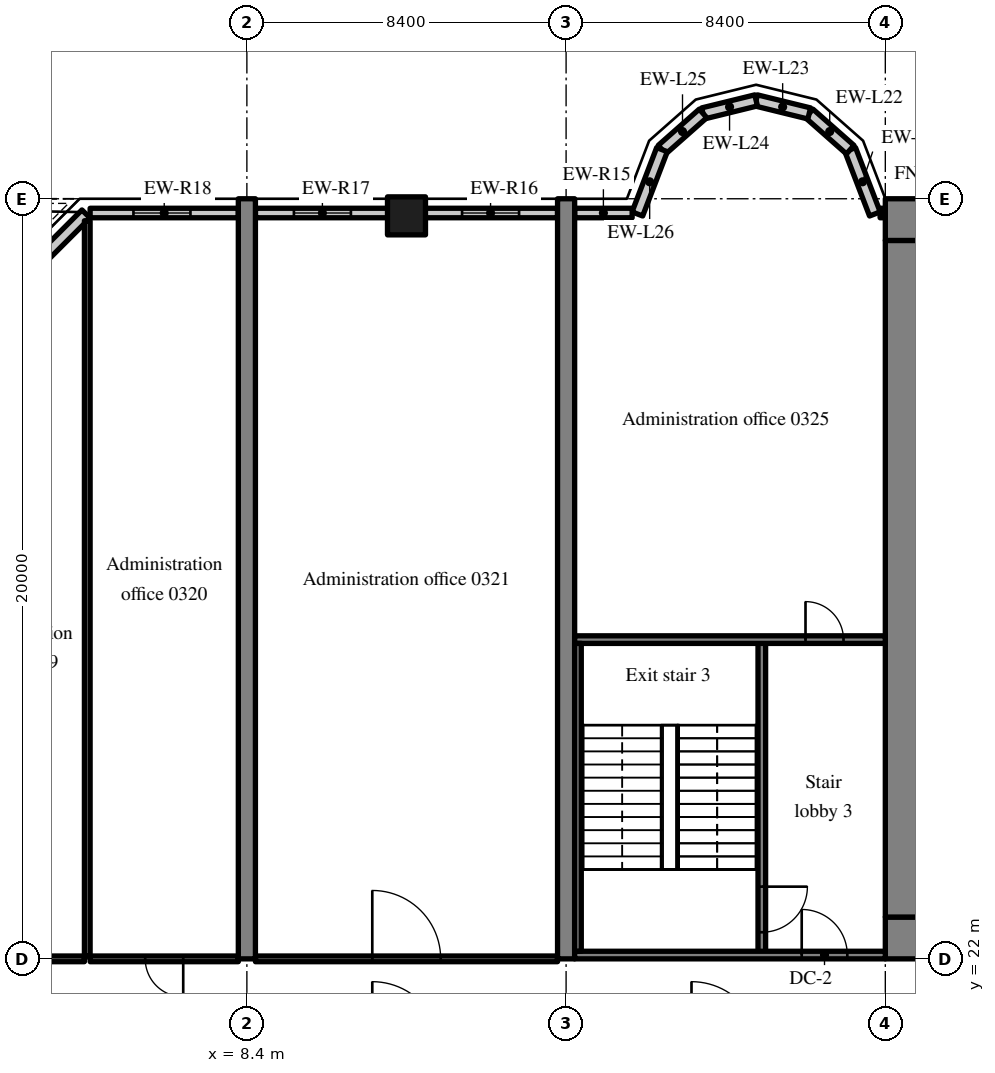
"""IFC4 building model, lengths in metres.
Left out: names, types, materials, properties, quantities, classifications, styles, units other than length and angle.
Written with IfcOpenShell. Run it as: python <this file> out.ifc"""

import sys

from ifc_helpers import new_model, si_unit, direction, frame, frame_2d, origin, origin_2d, place, context, subcontext, project, spatial, rectangle, extrude, source, transform, mapped, element, fill, save


model = new_model("IFC4")
c1 = context("Model", 3, precision=1e-05, world=origin(), true_north=direction((0.0, 1.0)))
c2 = subcontext(c1, "Body", "Model", "MODEL_VIEW")
j1 = project(units=[si_unit("LENGTHUNIT", "METRE"), si_unit("PLANEANGLEUNIT", "RADIAN")], contexts=[c1])
p1 = place(None, origin())
s1 = spatial("IfcSite", under=j1, at=p1, CompositionType="ELEMENT")
p2 = place(p1, origin())
s2 = spatial("IfcBuilding", under=s1, at=p2, CompositionType="ELEMENT")
p3 = place(p2, frame((0.0, 0.0, 18.0)))
s3 = spatial("IfcBuildingStorey", under=s2, at=p3, CompositionType="ELEMENT", Elevation=18.0)
m1 = source(origin(), c2, "Body", "SweptSolid", [
    extrude(rectangle(XDim=50.4, YDim=1.1, at=frame_2d((25.2, 0.0))), origin(), (0.0, 0.0, 1.0), 4.72),
])
p4 = place(p3, frame((25.2, 22.55, 0.0), z_axis=(0.0, 0.0, 1.0), x_axis=(1.0, 0.0, 0.0)))
e1 = element("IfcWall", 1, at=p4, inside=s3, PredefinedType="SHEAR", context=c2, shape_type="MappedRepresentation", body=[
    mapped(m1, transform((0.0, 0.0, 0.0), scale=1.0)),
])
m2 = source(origin(), c2, "Body", "SweptSolid", [
    extrude(rectangle(XDim=1.8, YDim=2.1, at=frame_2d((0.9, 1.05))), frame((0.0, 0.56, 0.0), z_axis=(0.0, -1.0, 0.0), x_axis=(1.0, 0.0, 0.0)), (0.0, 0.0, 1.0), 1.12),
])
p5 = place(p4, frame((15.9, 0.0, 0.0)))
e2 = element("IfcOpeningElement", 2, at=p5, cuts=e1, PredefinedType="OPENING", context=c2, shape_type="MappedRepresentation", body=[
    mapped(m2, transform((0.0, 0.0, 0.0), scale=1.0)),
])
m3 = source(origin(), c2, "Body", "SweptSolid", [
    extrude(rectangle(XDim=1.2, YDim=2.1, at=frame_2d((0.6, 1.05))), frame((0.0, 0.56, 0.0), z_axis=(0.0, -1.0, 0.0), x_axis=(1.0, 0.0, 0.0)), (0.0, 0.0, 1.0), 1.12),
])
p6 = place(p4, frame((27.0, 0.0, 0.0)))
e3 = element("IfcOpeningElement", 3, at=p6, cuts=e1, PredefinedType="OPENING", context=c2, shape_type="MappedRepresentation", body=[
    mapped(m3, transform((0.0, 0.0, 0.0), scale=1.0)),
])
m4 = source(origin(), c2, "Body", "SweptSolid", [
    extrude(rectangle(XDim=0.9, YDim=2.1, at=frame_2d((0.45, 1.05))), frame((0.0, 0.56, 0.0), z_axis=(0.0, -1.0, 0.0), x_axis=(1.0, 0.0, 0.0)), (0.0, 0.0, 1.0), 1.12),
])
p7 = place(p4, frame((34.5, 0.0, 0.0)))
e4 = element("IfcOpeningElement", 4, at=p7, cuts=e1, PredefinedType="OPENING", context=c2, shape_type="MappedRepresentation", body=[
    mapped(m4, transform((0.0, 0.0, 0.0), scale=1.0)),
])
p8 = place(p4, frame((31.5, 0.0, 0.0)))
e5 = element("IfcOpeningElement", 5, at=p8, cuts=e1, PredefinedType="OPENING", context=c2, shape_type="MappedRepresentation", body=[
    mapped(m4, transform((0.0, 0.0, 0.0), scale=1.0)),
])
p9 = place(p4, frame((39.75, 0.0, 0.0)))
e6 = element("IfcOpeningElement", 6, at=p9, cuts=e1, PredefinedType="OPENING", context=c2, shape_type="MappedRepresentation", body=[
    mapped(m4, transform((0.0, 0.0, 0.0), scale=1.0)),
])
p10 = place(p4, frame((36.75, 0.0, 0.0)))
e7 = element("IfcOpeningElement", 7, at=p10, cuts=e1, PredefinedType="OPENING", context=c2, shape_type="MappedRepresentation", body=[
    mapped(m4, transform((0.0, 0.0, 0.0), scale=1.0)),
])
p11 = place(p4, frame((6.425, 0.0, 0.0)))
e8 = element("IfcOpeningElement", 8, at=p11, cuts=e1, PredefinedType="OPENING", context=c2, shape_type="MappedRepresentation", body=[
    mapped(m3, transform((0.0, 0.0, 0.0), scale=1.0)),
])
p12 = place(p4, frame((47.675, 0.0, 0.0)))
e9 = element("IfcOpeningElement", 9, at=p12, cuts=e1, PredefinedType="OPENING", context=c2, shape_type="MappedRepresentation", body=[
    mapped(m3, transform((0.0, 0.0, 0.0), scale=1.0)),
])
p13 = place(p3, frame((25.2, 41.45, 0.0), z_axis=(0.0, 0.0, 1.0), x_axis=(1.0, 0.0, 0.0)))
e10 = element("IfcWall", 10, at=p13, inside=s3, PredefinedType="SHEAR", context=c2, shape_type="MappedRepresentation", body=[
    mapped(m1, transform((0.0, 0.0, 0.0), scale=1.0)),
])
m5 = source(origin(), c2, "Body", "SweptSolid", [
    extrude(rectangle(XDim=17.8, YDim=1.1, at=frame_2d((8.9, 0.0))), origin(), (0.0, 0.0, 1.0), 4.72),
])
p14 = place(p3, frame((25.75, 23.1, 0.0), z_axis=(0.0, 0.0, 1.0), x_axis=(0.0, 1.0, 0.0)))
e11 = element("IfcWall", 11, at=p14, inside=s3, PredefinedType="SHEAR", context=c2, shape_type="MappedRepresentation", body=[
    mapped(m5, transform((0.0, 0.0, 0.0), scale=1.0)),
])
m6 = source(origin(), c2, "Body", "SweptSolid", [
    extrude(rectangle(XDim=20.0, YDim=0.45, at=frame_2d((10.0, 0.0))), origin(), (0.0, 0.0, 1.0), 4.72),
])
for number, where, z_axis, x_axis in (
    (12, (8.4, 22.0, 0.0), (0.0, 0.0, 1.0), (0.0, 1.0, 0.0)),
    (13, (16.8, 22.0, 0.0), (0.0, 0.0, 1.0), (0.0, 1.0, 0.0)),
):
    element("IfcWall", number, at=place(p3, frame(where, z_axis=z_axis, x_axis=x_axis)), inside=s3, PredefinedType="SHEAR", context=c2, shape_type="MappedRepresentation", body=[
        mapped(m6, transform((0.0, 0.0, 0.0), scale=1.0)),
    ])
m7 = source(origin(), c2, "Body", "SweptSolid", [
    extrude(rectangle(XDim=1.0, YDim=1.0, at=origin_2d()), origin(), (0.0, 0.0, 1.0), 4.72),
])
p15 = place(p3, frame((12.6, 41.55, 0.0), z_axis=(0.0, 0.0, 1.0), x_axis=(1.0, 0.0, 0.0)))
e14 = element("IfcColumn", 14, at=p15, inside=s3, PredefinedType="COLUMN", context=c2, shape_type="MappedRepresentation", body=[
    mapped(m7, transform((0.0, 0.0, 0.0), scale=1.0)),
])
m8 = source(origin(), c2, "Body", "SweptSolid", [
    extrude(rectangle(XDim=0.138, YDim=0.25, at=frame_2d((0.069, 0.0))), origin(), (0.0, 0.0, 1.0), 3.97),
])
p16 = place(p3, frame((25.2, 41.625, 0.0), z_axis=(0.0, 0.0, 1.0), x_axis=(-1.0, 0.0, 0.0)))
e15 = element("IfcWall", 15, at=p16, inside=s3, PredefinedType="SOLIDWALL", context=c2, shape_type="MappedRepresentation", body=[
    mapped(m8, transform((0.0, 0.0, 0.0), scale=1.0)),
])
m9 = source(origin(), c2, "Body", "SweptSolid", [
    extrude(rectangle(XDim=1.812, YDim=0.3, at=frame_2d((0.906, 0.0))), origin(), (0.0, 0.0, 1.0), 4.72),
])
p17 = place(p3, frame((24.925, 41.6, 0.0), z_axis=(0.0, 0.0, 1.0), x_axis=(-0.357759776872, 0.933813654886, 0.0)))
e16 = element("IfcWall", 16, at=p17, inside=s3, PredefinedType="SOLIDWALL", context=c2, shape_type="MappedRepresentation", body=[
    mapped(m9, transform((0.0, 0.0, 0.0), scale=1.0)),
])
m10 = source(origin(), c2, "Body", "SweptSolid", [
    extrude(rectangle(XDim=1.44, YDim=0.3, at=frame_2d((0.72, 0.0))), origin(), (0.0, 0.0, 1.0), 4.72),
])
p18 = place(p3, frame((24.277, 43.292, 0.0), z_axis=(0.0, 0.0, 1.0), x_axis=(-0.749649827867, 0.661834673902, 0.0)))
e17 = element("IfcWall", 17, at=p18, inside=s3, PredefinedType="SOLIDWALL", context=c2, shape_type="MappedRepresentation", body=[
    mapped(m10, transform((0.0, 0.0, 0.0), scale=1.0)),
])
m11 = source(origin(), c2, "Body", "SweptSolid", [
    extrude(rectangle(XDim=1.438, YDim=0.3, at=frame_2d((0.719, 0.0))), origin(), (0.0, 0.0, 1.0), 4.72),
])
p19 = place(p3, frame((23.197, 44.245, 0.0), z_axis=(0.0, 0.0, 1.0), x_axis=(-0.971152283879, 0.238460146601, 0.0)))
e18 = element("IfcWall", 18, at=p19, inside=s3, PredefinedType="SOLIDWALL", context=c2, shape_type="MappedRepresentation", body=[
    mapped(m11, transform((0.0, 0.0, 0.0), scale=1.0)),
])
m12 = source(origin(), c2, "Body", "SweptSolid", [
    extrude(rectangle(XDim=1.439, YDim=0.3, at=frame_2d((0.719, 0.0))), origin(), (0.0, 0.0, 1.0), 4.72),
])
p20 = place(p3, frame((21.8, 44.588, 0.0), z_axis=(0.0, 0.0, 1.0), x_axis=(-0.971161932466, -0.238420848351, 0.0)))
e19 = element("IfcWall", 19, at=p20, inside=s3, PredefinedType="SOLIDWALL", context=c2, shape_type="MappedRepresentation", body=[
    mapped(m12, transform((0.0, 0.0, 0.0), scale=1.0)),
])
m13 = source(origin(), c2, "Body", "SweptSolid", [
    extrude(rectangle(XDim=1.44, YDim=0.3, at=frame_2d((0.72, 0.0))), origin(), (0.0, 0.0, 1.0), 4.72),
])
p21 = place(p3, frame((20.403, 44.245, 0.0), z_axis=(0.0, 0.0, 1.0), x_axis=(-0.74957555648, -0.661918790432, 0.0)))
e20 = element("IfcWall", 20, at=p21, inside=s3, PredefinedType="SOLIDWALL", context=c2, shape_type="MappedRepresentation", body=[
    mapped(m13, transform((0.0, 0.0, 0.0), scale=1.0)),
])
m14 = source(origin(), c2, "Body", "SweptSolid", [
    extrude(rectangle(XDim=1.812, YDim=0.3, at=frame_2d((0.906, 0.0))), origin(), (0.0, 0.0, 1.0), 4.72),
])
p22 = place(p3, frame((19.323, 43.292, 0.0), z_axis=(0.0, 0.0, 1.0), x_axis=(-0.357877270961, -0.93376863244, 0.0)))
e21 = element("IfcWall", 21, at=p22, inside=s3, PredefinedType="SOLIDWALL", context=c2, shape_type="MappedRepresentation", body=[
    mapped(m14, transform((0.0, 0.0, 0.0), scale=1.0)),
])
m15 = source(origin(), c2, "Body", "SweptSolid", [
    extrude(rectangle(XDim=1.513, YDim=0.25, at=frame_2d((0.756, 0.0))), origin(), (0.0, 0.0, 1.0), 3.97),
])
p23 = place(p3, frame((18.538, 41.625, 0.0), z_axis=(0.0, 0.0, 1.0), x_axis=(-1.0, 0.0, 0.0)))
e22 = element("IfcWall", 22, at=p23, inside=s3, PredefinedType="SOLIDWALL", context=c2, shape_type="MappedRepresentation", body=[
    mapped(m15, transform((0.0, 0.0, 0.0), scale=1.0)),
])
m16 = source(origin(), c2, "Body", "SweptSolid", [
    extrude(rectangle(XDim=3.525, YDim=0.25, at=frame_2d((1.762, 0.0))), origin(), (0.0, 0.0, 1.0), 3.97),
])
p24 = place(p3, frame((16.575, 41.625, 0.0), z_axis=(0.0, 0.0, 1.0), x_axis=(-1.0, 0.0, 0.0)))
e23 = element("IfcWall", 23, at=p24, inside=s3, PredefinedType="SOLIDWALL", context=c2, shape_type="MappedRepresentation", body=[
    mapped(m16, transform((0.0, 0.0, 0.0), scale=1.0)),
])
m17 = source(origin(), c2, "Body", "SweptSolid", [
    extrude(rectangle(XDim=1.5, YDim=1.5, at=frame_2d((0.75, 0.75))), frame((0.0, 0.135, 0.0), z_axis=(0.0, -1.0, 0.0), x_axis=(1.0, 0.0, 0.0)), (0.0, 0.0, 1.0), 0.27),
])
p25 = place(p24, frame((1.012, 0.0, 0.9)))
e24 = element("IfcOpeningElement", 24, at=p25, cuts=e23, PredefinedType="OPENING", context=c2, shape_type="MappedRepresentation", body=[
    mapped(m17, transform((0.0, 0.0, 0.0), scale=1.0)),
])
p26 = place(p3, frame((12.15, 41.625, 0.0), z_axis=(0.0, 0.0, 1.0), x_axis=(-1.0, 0.0, 0.0)))
e25 = element("IfcWall", 25, at=p26, inside=s3, PredefinedType="SOLIDWALL", context=c2, shape_type="MappedRepresentation", body=[
    mapped(m16, transform((0.0, 0.0, 0.0), scale=1.0)),
])
p27 = place(p26, frame((1.012, 0.0, 0.9)))
e26 = element("IfcOpeningElement", 26, at=p27, cuts=e25, PredefinedType="OPENING", context=c2, shape_type="MappedRepresentation", body=[
    mapped(m17, transform((0.0, 0.0, 0.0), scale=1.0)),
])
m18 = source(origin(), c2, "Body", "SweptSolid", [
    extrude(rectangle(XDim=3.9, YDim=0.25, at=frame_2d((1.95, 0.0))), origin(), (0.0, 0.0, 1.0), 3.97),
])
p28 = place(p3, frame((8.175, 41.625, 0.0), z_axis=(0.0, 0.0, 1.0), x_axis=(-1.0, 0.0, 0.0)))
e27 = element("IfcWall", 27, at=p28, inside=s3, PredefinedType="SOLIDWALL", context=c2, shape_type="MappedRepresentation", body=[
    mapped(m18, transform((0.0, 0.0, 0.0), scale=1.0)),
])
p29 = place(p28, frame((1.26, 0.0, 0.9)))
e28 = element("IfcOpeningElement", 28, at=p29, cuts=e27, PredefinedType="OPENING", context=c2, shape_type="MappedRepresentation", body=[
    mapped(m17, transform((0.0, 0.0, 0.0), scale=1.0)),
])
m19 = source(origin(), c2, "Body", "SweptSolid", [
    extrude(rectangle(XDim=5.173, YDim=0.3, at=frame_2d((2.586, 0.0))), origin(), (0.0, 0.0, 1.0), 3.97),
])
p30 = place(p3, frame((4.166, 41.6, 0.0), z_axis=(0.0, 0.0, 1.0), x_axis=(-0.707106781187, -0.707106781187, 0.0)))
e29 = element("IfcWall", 29, at=p30, inside=s3, PredefinedType="SOLIDWALL", context=c2, shape_type="MappedRepresentation", body=[
    mapped(m19, transform((0.0, 0.0, 0.0), scale=1.0)),
])
m20 = source(origin(), c2, "Body", "SweptSolid", [
    extrude(rectangle(XDim=1.5, YDim=1.5, at=frame_2d((0.75, 0.75))), frame((0.0, 0.16, 0.0), z_axis=(0.0, -1.0, 0.0), x_axis=(1.0, 0.0, 0.0)), (0.0, 0.0, 1.0), 0.32),
])
p31 = place(p30, frame((1.836, 0.0, 0.9)))
e30 = element("IfcOpeningElement", 30, at=p31, cuts=e29, PredefinedType="OPENING", context=c2, shape_type="MappedRepresentation", body=[
    mapped(m20, transform((0.0, 0.0, 0.0), scale=1.0)),
])
m21 = source(origin(), c2, "Body", "SweptSolid", [
    extrude(rectangle(XDim=8.3, YDim=0.2, at=frame_2d((4.15, 0.0))), origin(), (0.0, 0.0, 1.0), 4.72),
])
p32 = place(p3, frame((21.95, 22.1, 0.0), z_axis=(0.0, 0.0, 1.0), x_axis=(0.0, 1.0, 0.0)))
e31 = element("IfcWall", 31, at=p32, inside=s3, PredefinedType="SOLIDWALL", context=c2, shape_type="MappedRepresentation", body=[
    mapped(m21, transform((0.0, 0.0, 0.0), scale=1.0)),
])
m22 = source(origin(), c2, "Body", "SweptSolid", [
    extrude(rectangle(XDim=1.2, YDim=2.1, at=frame_2d((0.6, 1.05))), frame((0.0, 0.11, 0.0), z_axis=(0.0, -1.0, 0.0), x_axis=(1.0, 0.0, 0.0)), (0.0, 0.0, 1.0), 0.22),
])
p33 = place(p32, frame((0.6, 0.0, 0.0)))
e32 = element("IfcOpeningElement", 32, at=p33, cuts=e31, PredefinedType="OPENING", context=c2, shape_type="MappedRepresentation", body=[
    mapped(m22, transform((0.0, 0.0, 0.0), scale=1.0)),
])
m23 = source(origin(), c2, "Body", "SweptSolid", [
    extrude(rectangle(XDim=8.175, YDim=0.2, at=frame_2d((4.087, 0.0))), origin(), (0.0, 0.0, 1.0), 4.72),
])
p34 = place(p3, frame((17.025, 22.1, 0.0), z_axis=(0.0, 0.0, 1.0), x_axis=(1.0, 0.0, 0.0)))
e33 = element("IfcWall", 33, at=p34, inside=s3, PredefinedType="SOLIDWALL", context=c2, shape_type="MappedRepresentation", body=[
    mapped(m23, transform((0.0, 0.0, 0.0), scale=1.0)),
])
p35 = place(p34, frame((5.975, 0.0, 0.0)))
e34 = element("IfcOpeningElement", 34, at=p35, cuts=e33, PredefinedType="OPENING", context=c2, shape_type="MappedRepresentation", body=[
    mapped(m22, transform((0.0, 0.0, 0.0), scale=1.0)),
])
p36 = place(p3, frame((17.025, 30.4, 0.0), z_axis=(0.0, 0.0, 1.0), x_axis=(1.0, 0.0, 0.0)))
e35 = element("IfcWall", 35, at=p36, inside=s3, PredefinedType="SOLIDWALL", context=c2, shape_type="MappedRepresentation", body=[
    mapped(m23, transform((0.0, 0.0, 0.0), scale=1.0)),
])
m24 = source(origin(), c2, "Body", "SweptSolid", [
    extrude(rectangle(XDim=1.0, YDim=2.1, at=frame_2d((0.5, 1.05))), frame((0.0, 0.11, 0.0), z_axis=(0.0, -1.0, 0.0), x_axis=(1.0, 0.0, 0.0)), (0.0, 0.0, 1.0), 0.22),
])
p37 = place(p36, frame((6.075, 0.0, 0.0)))
e36 = element("IfcOpeningElement", 36, at=p37, cuts=e35, PredefinedType="OPENING", context=c2, shape_type="MappedRepresentation", body=[
    mapped(m24, transform((0.0, 0.0, 0.0), scale=1.0)),
])
m25 = source(origin(), c2, "Body", "SweptSolid", [
    extrude(rectangle(XDim=8.1, YDim=0.175, at=frame_2d((4.05, 0.0))), origin(), (0.0, 0.0, 1.0), 4.72),
])
p38 = place(p3, frame((17.112, 22.2, 0.0), z_axis=(0.0, 0.0, 1.0), x_axis=(0.0, 1.0, 0.0)))
e37 = element("IfcWall", 37, at=p38, inside=s3, PredefinedType="SOLIDWALL", context=c2, shape_type="MappedRepresentation", body=[
    mapped(m25, transform((0.0, 0.0, 0.0), scale=1.0)),
])
m26 = source(origin(), c2, "Body", "SweptSolid", [
    extrude(rectangle(XDim=3.625, YDim=0.15, at=frame_2d((1.812, 0.0))), origin(), (0.0, 0.0, 1.0), 4.02),
])
p39 = place(p3, frame((0.5, 22.0, 0.0), z_axis=(0.0, 0.0, 1.0), x_axis=(1.0, 0.0, 0.0)))
e38 = element("IfcWall", 38, at=p39, inside=s3, PredefinedType="PARTITIONING", context=c2, shape_type="MappedRepresentation", body=[
    mapped(m26, transform((0.0, 0.0, 0.0), scale=1.0)),
])
m27 = source(origin(), c2, "Body", "SweptSolid", [
    extrude(rectangle(XDim=1.0, YDim=2.1, at=frame_2d((0.5, 1.05))), frame((0.0, 0.085, 0.0), z_axis=(0.0, -1.0, 0.0), x_axis=(1.0, 0.0, 0.0)), (0.0, 0.0, 1.0), 0.17),
])
p40 = place(p39, frame((1.288, 0.0, 0.0)))
e39 = element("IfcOpeningElement", 39, at=p40, cuts=e38, PredefinedType="OPENING", context=c2, shape_type="MappedRepresentation", body=[
    mapped(m27, transform((0.0, 0.0, 0.0), scale=1.0)),
])
m28 = source(origin(), c2, "Body", "SweptSolid", [
    extrude(rectangle(XDim=3.9, YDim=0.15, at=frame_2d((1.95, 0.0))), origin(), (0.0, 0.0, 1.0), 4.02),
])
p41 = place(p3, frame((4.275, 22.0, 0.0), z_axis=(0.0, 0.0, 1.0), x_axis=(1.0, 0.0, 0.0)))
e40 = element("IfcWall", 40, at=p41, inside=s3, PredefinedType="PARTITIONING", context=c2, shape_type="MappedRepresentation", body=[
    mapped(m28, transform((0.0, 0.0, 0.0), scale=1.0)),
])
p42 = place(p41, frame((1.45, 0.0, 0.0)))
e41 = element("IfcOpeningElement", 41, at=p42, cuts=e40, PredefinedType="OPENING", context=c2, shape_type="MappedRepresentation", body=[
    mapped(m27, transform((0.0, 0.0, 0.0), scale=1.0)),
])
m29 = source(origin(), c2, "Body", "SweptSolid", [
    extrude(rectangle(XDim=19.347, YDim=0.15, at=frame_2d((9.674, 0.0))), origin(), (0.0, 0.0, 1.0), 4.72),
])
p43 = place(p3, frame((4.2, 22.075, 0.0), z_axis=(0.0, 0.0, 1.0), x_axis=(0.0, 1.0, 0.0)))
e42 = element("IfcWall", 42, at=p43, inside=s3, PredefinedType="PARTITIONING", context=c2, shape_type="MappedRepresentation", body=[
    mapped(m29, transform((0.0, 0.0, 0.0), scale=1.0)),
])
m30 = source(origin(), c2, "Body", "SweptSolid", [
    extrude(rectangle(XDim=7.95, YDim=0.15, at=frame_2d((3.975, 0.0))), origin(), (0.0, 0.0, 1.0), 4.02),
])
p44 = place(p3, frame((8.625, 22.0, 0.0), z_axis=(0.0, 0.0, 1.0), x_axis=(1.0, 0.0, 0.0)))
e43 = element("IfcWall", 43, at=p44, inside=s3, PredefinedType="PARTITIONING", context=c2, shape_type="MappedRepresentation", body=[
    mapped(m30, transform((0.0, 0.0, 0.0), scale=1.0)),
])
m31 = source(origin(), c2, "Body", "SweptSolid", [
    extrude(rectangle(XDim=1.8, YDim=2.1, at=frame_2d((0.9, 1.05))), frame((0.0, 0.085, 0.0), z_axis=(0.0, -1.0, 0.0), x_axis=(1.0, 0.0, 0.0)), (0.0, 0.0, 1.0), 0.17),
])
p45 = place(p44, frame((3.075, 0.0, 0.0)))
e44 = element("IfcOpeningElement", 44, at=p45, cuts=e43, PredefinedType="OPENING", context=c2, shape_type="MappedRepresentation", body=[
    mapped(m31, transform((0.0, 0.0, 0.0), scale=1.0)),
])
m32 = source(origin(), c2, "Body", "SweptSolid", [
    extrude(rectangle(XDim=1.5, YDim=1.5, at=frame_2d((0.75, 0.75))), frame((0.0, 0.03, 0.0), z_axis=(0.0, -1.0, 0.0), x_axis=(1.0, 0.0, 0.0)), (0.0, 0.0, 1.0), 0.06),
])
p46 = place(p25, origin())
e45 = element("IfcWindow", 45, at=p46, inside=s3, PartitioningType="SINGLE_PANEL", PredefinedType="WINDOW", context=c2, shape_type="MappedRepresentation", body=[
    mapped(m32, transform((0.0, 0.0, 0.0), scale=1.0)),
])
fill(e24, e45)
p47 = place(p27, origin())
e46 = element("IfcWindow", 46, at=p47, inside=s3, PartitioningType="SINGLE_PANEL", PredefinedType="WINDOW", context=c2, shape_type="MappedRepresentation", body=[
    mapped(m32, transform((0.0, 0.0, 0.0), scale=1.0)),
])
fill(e26, e46)
p48 = place(p29, origin())
e47 = element("IfcWindow", 47, at=p48, inside=s3, PartitioningType="SINGLE_PANEL", PredefinedType="WINDOW", context=c2, shape_type="MappedRepresentation", body=[
    mapped(m32, transform((0.0, 0.0, 0.0), scale=1.0)),
])
fill(e28, e47)
m33 = source(origin(), c2, "Body", "SweptSolid", [
    extrude(rectangle(XDim=1.2, YDim=2.1, at=frame_2d((0.6, 1.05))), frame((0.0, 0.025, 0.0), z_axis=(0.0, -1.0, 0.0), x_axis=(1.0, 0.0, 0.0)), (0.0, 0.0, 1.0), 0.05),
])
p49 = place(p33, origin())
e48 = element("IfcDoor", 48, at=p49, inside=s3, OperationType="SINGLE_SWING_RIGHT", PredefinedType="DOOR", context=c2, shape_type="MappedRepresentation", body=[
    mapped(m33, transform((0.0, 0.0, 0.0), scale=1.0)),
])
fill(e32, e48)
p50 = place(p35, origin())
e49 = element("IfcDoor", 49, at=p50, inside=s3, OperationType="SINGLE_SWING_LEFT", PredefinedType="DOOR", context=c2, shape_type="MappedRepresentation", body=[
    mapped(m33, transform((0.0, 0.0, 0.0), scale=1.0)),
])
fill(e34, e49)
m34 = source(origin(), c2, "Body", "SweptSolid", [
    extrude(rectangle(XDim=1.0, YDim=2.1, at=frame_2d((0.5, 1.05))), frame((0.0, 0.025, 0.0), z_axis=(0.0, -1.0, 0.0), x_axis=(1.0, 0.0, 0.0)), (0.0, 0.0, 1.0), 0.05),
])
p51 = place(p37, origin())
e50 = element("IfcDoor", 50, at=p51, inside=s3, OperationType="SINGLE_SWING_LEFT", PredefinedType="DOOR", context=c2, shape_type="MappedRepresentation", body=[
    mapped(m34, transform((0.0, 0.0, 0.0), scale=1.0)),
])
fill(e36, e50)
p52 = place(p42, origin())
e51 = element("IfcDoor", 51, at=p52, inside=s3, OperationType="SINGLE_SWING_RIGHT", PredefinedType="DOOR", context=c2, shape_type="MappedRepresentation", body=[
    mapped(m34, transform((0.0, 0.0, 0.0), scale=1.0)),
])
fill(e41, e51)
m35 = source(origin(), c2, "Body", "SweptSolid", [
    extrude(rectangle(XDim=1.8, YDim=2.1, at=frame_2d((0.9, 1.05))), frame((0.0, 0.025, 0.0), z_axis=(0.0, -1.0, 0.0), x_axis=(1.0, 0.0, 0.0)), (0.0, 0.0, 1.0), 0.05),
])
p53 = place(p45, origin())
e52 = element("IfcDoor", 52, at=p53, inside=s3, OperationType="DOUBLE_DOOR_SINGLE_SWING", PredefinedType="DOOR", context=c2, shape_type="MappedRepresentation", body=[
    mapped(m35, transform((0.0, 0.0, 0.0), scale=1.0)),
])
fill(e44, e52)
save(model, sys.argv[1])
